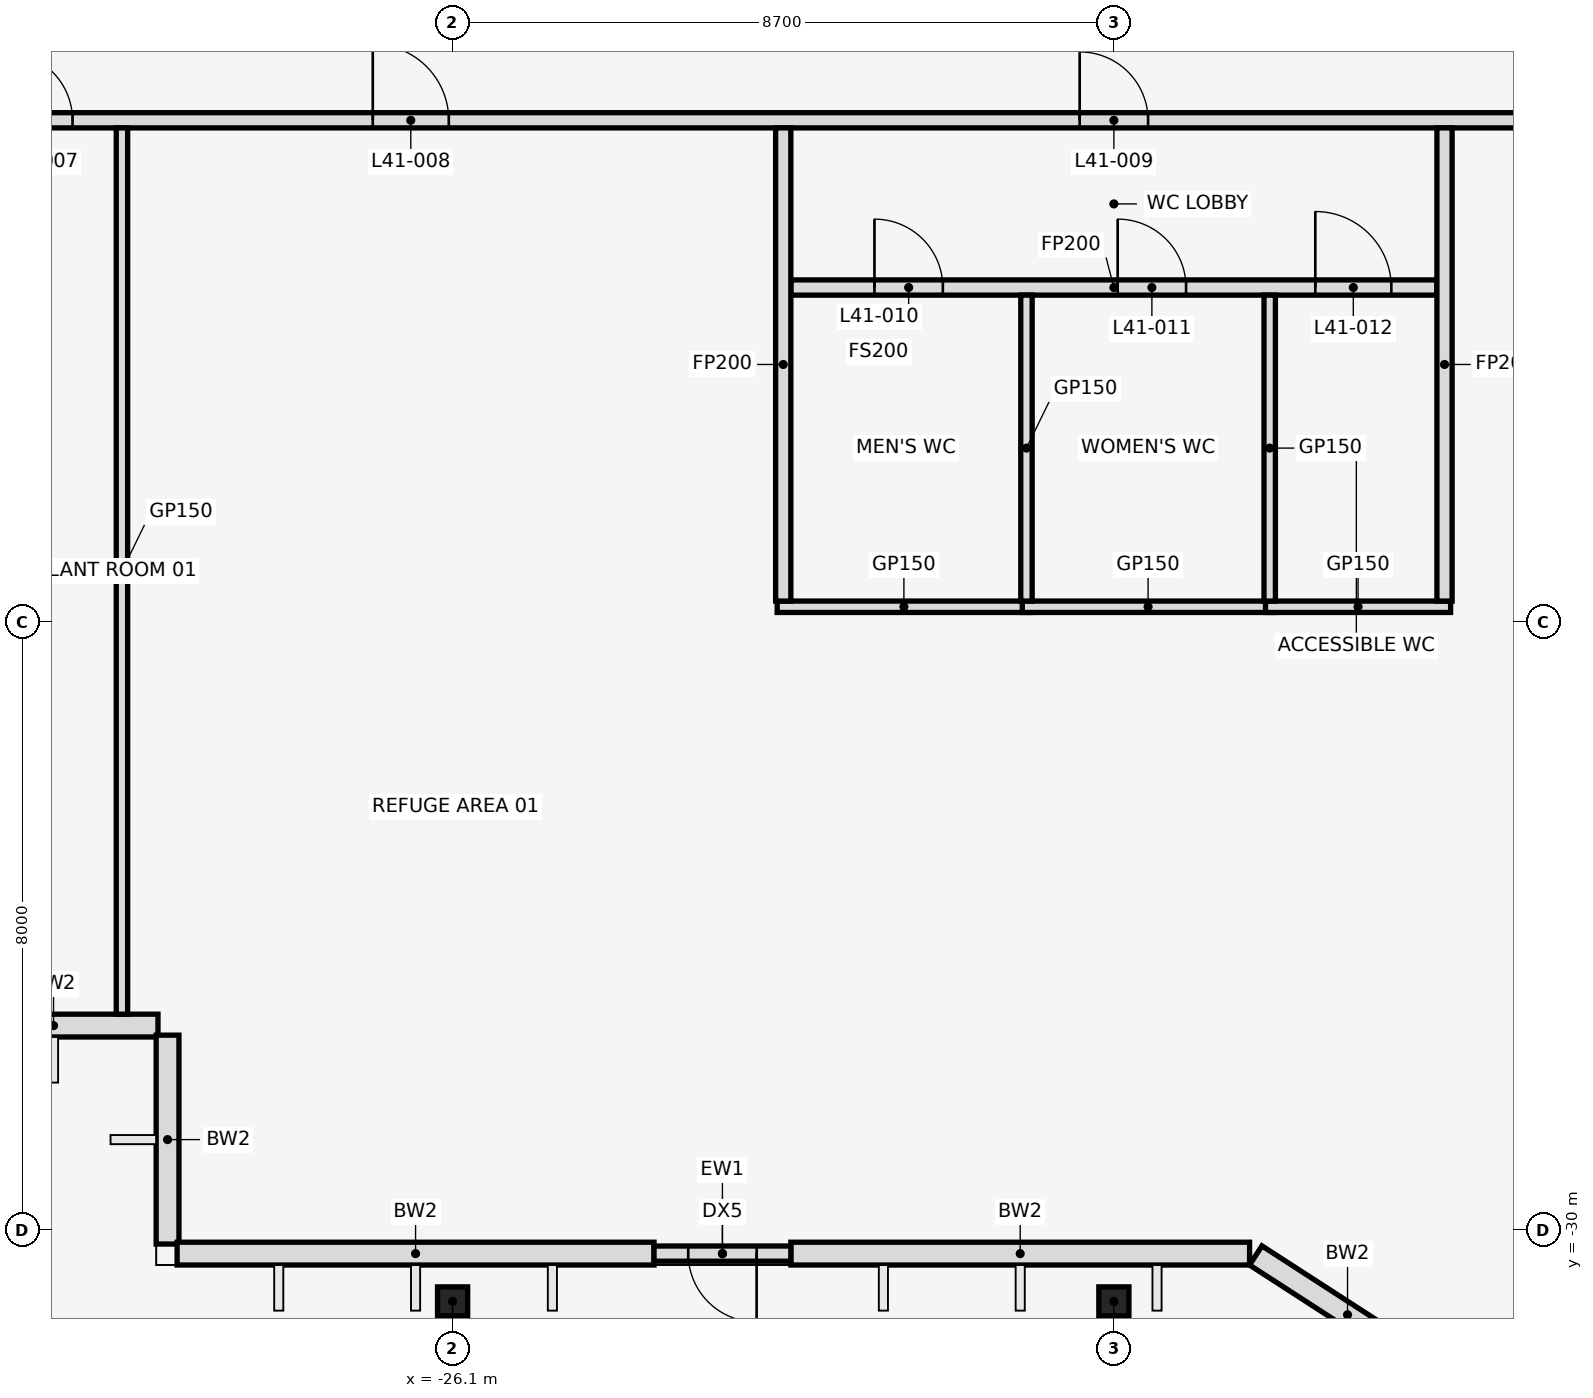
"""IFC4 building model, lengths in metres.
Left out: names, types, materials, properties, quantities, classifications, styles, units other than length and angle.
Written with IfcOpenShell. Run it as: python <this file> out.ifc"""

import sys

from ifc_helpers import new_model, si_unit, direction, frame, frame_2d, origin, origin_2d, place, context, subcontext, project, spatial, rectangle, i_section, extrude, element, fill, save


model = new_model("IFC4")
c1 = context("Model", 3, precision=1e-05, world=origin(), true_north=direction((0.0, 1.0)))
c2 = subcontext(c1, "Body", "Model", "MODEL_VIEW")
j1 = project(units=[si_unit("LENGTHUNIT", "METRE"), si_unit("PLANEANGLEUNIT", "RADIAN")], contexts=[c1])
p1 = place(None, origin())
s1 = spatial("IfcSite", under=j1, at=p1, CompositionType="ELEMENT")
p2 = place(p1, origin())
s2 = spatial("IfcBuilding", under=s1, at=p2, CompositionType="ELEMENT")
p3 = place(p2, frame((0.0, 0.0, 185.5)))
s3 = spatial("IfcBuildingStorey", under=s2, at=p3, CompositionType="ELEMENT", Elevation=185.5)
for number, where, z_axis, x_axis in (
    (1, (-26.1, -30.938, 0.0), (0.0, 0.0, 1.0), (1.0, 0.0, 0.0)),
    (2, (-17.4, -30.938, 0.0), (0.0, 0.0, 1.0), (1.0, 0.0, 0.0)),
):
    element("IfcColumn", number, at=place(p3, frame(where, z_axis=z_axis, x_axis=x_axis)), inside=s3, PredefinedType="COLUMN", context=c2, shape_type="SweptSolid", body=[
        extrude(i_section(OverallWidth=0.396, OverallDepth=0.381, WebThickness=0.019, FlangeThickness=0.03, at=origin_2d()), origin(), (0.0, 0.0, 1.0), 5.4),
    ])
for number, where, z_axis, x_axis in (
    (3, (-32.724, -27.31, 0.0), (0.0, 0.0, 1.0), (1.0, 0.0, 0.0)),
    (4, (-29.85, -27.436, 0.0), (0.0, 0.0, 1.0), (0.0, -1.0, 0.0)),
):
    element("IfcWall", number, at=place(p3, frame(where, z_axis=z_axis, x_axis=x_axis)), inside=s3, PredefinedType="STANDARD", context=c2, shape_type="SweptSolid", body=[
        extrude(rectangle(XDim=2.748, YDim=0.3, at=frame_2d((1.374, 0.0))), origin(), (0.0, 0.0, 1.0), 4.414),
    ])
p4 = place(p3, frame((-29.724, -30.31, 0.0), z_axis=(0.0, 0.0, 1.0), x_axis=(1.0, 0.0, 0.0)))
e5 = element("IfcWall", 5, at=p4, inside=s3, PredefinedType="STANDARD", context=c2, shape_type="SweptSolid", body=[
    extrude(rectangle(XDim=6.274, YDim=0.3, at=frame_2d((3.137, 0.0))), origin(), (0.0, 0.0, 1.0), 4.414),
])
p5 = place(p3, frame((-21.65, -30.31, 0.0), z_axis=(0.0, 0.0, 1.0), x_axis=(1.0, 0.0, 0.0)))
e6 = element("IfcWall", 6, at=p5, inside=s3, PredefinedType="STANDARD", context=c2, shape_type="SweptSolid", body=[
    extrude(rectangle(XDim=6.035, YDim=0.3, at=frame_2d((3.018, 0.0))), origin(), (0.0, 0.0, 1.0), 4.414),
])
p6 = place(p3, frame((-15.533, -30.334, 0.0), z_axis=(0.0, 0.0, 1.0), x_axis=(0.839779682339, -0.542927329512, 0.0)))
e7 = element("IfcWall", 7, at=p6, inside=s3, PredefinedType="STANDARD", context=c2, shape_type="SweptSolid", body=[
    extrude(rectangle(XDim=2.875, YDim=0.3, at=frame_2d((1.438, 0.0))), origin(), (0.0, 0.0, 1.0), 4.346),
])
p7 = place(p3, frame((-21.65, -30.31, 0.0), z_axis=(0.0, 0.0, 1.0), x_axis=(-1.0, 0.0, 0.0)))
e8 = element("IfcWall", 8, at=p7, inside=s3, PredefinedType="STANDARD", context=c2, shape_type="SweptSolid", body=[
    extrude(rectangle(XDim=1.8, YDim=0.2, at=frame_2d((0.9, 0.0))), origin(), (0.0, 0.0, 1.0), 5.25),
])
p8 = place(p7, frame((0.45, 0.0, 0.0)))
e9 = element("IfcOpeningElement", 9, at=p8, cuts=e8, PredefinedType="OPENING", context=c2, shape_type="SweptSolid", body=[
    extrude(rectangle(XDim=0.9, YDim=2.1, at=frame_2d((0.45, 1.05))), frame((0.0, 0.112, 0.0), z_axis=(0.0, -1.0, 0.0), x_axis=(1.0, 0.0, 0.0)), (0.0, 0.0, 1.0), 0.224),
])
p9 = place(p3, frame((-21.83, -21.8, 0.0), z_axis=(0.0, 0.0, 1.0), x_axis=(1.0, 0.0, 0.0)))
e10 = element("IfcWall", 10, at=p9, inside=s3, PredefinedType="PARTITIONING", context=c2, shape_type="SweptSolid", body=[
    extrude(rectangle(XDim=3.335, YDim=0.15, at=frame_2d((1.667, 0.0))), origin(), (0.0, 0.0, 1.0), 4.26),
])
p10 = place(p3, frame((-18.605, -21.8, 0.0), z_axis=(0.0, 0.0, 1.0), x_axis=(1.0, 0.0, 0.0)))
e11 = element("IfcWall", 11, at=p10, inside=s3, PredefinedType="PARTITIONING", context=c2, shape_type="SweptSolid", body=[
    extrude(rectangle(XDim=3.31, YDim=0.15, at=frame_2d((1.655, 0.0))), origin(), (0.0, 0.0, 1.0), 4.26),
])
p11 = place(p3, frame((-15.405, -21.8, 0.0), z_axis=(0.0, 0.0, 1.0), x_axis=(1.0, 0.0, 0.0)))
e12 = element("IfcWall", 12, at=p11, inside=s3, PredefinedType="PARTITIONING", context=c2, shape_type="SweptSolid", body=[
    extrude(rectangle(XDim=2.435, YDim=0.15, at=frame_2d((1.218, 0.0))), origin(), (0.0, 0.0, 1.0), 4.26),
])
p12 = place(p3, frame((-21.65, -17.6, 0.0), z_axis=(0.0, 0.0, 1.0), x_axis=(1.0, 0.0, 0.0)))
e13 = element("IfcWall", 13, at=p12, inside=s3, PredefinedType="PARTITIONING", context=c2, shape_type="SweptSolid", body=[
    extrude(rectangle(XDim=8.5, YDim=0.2, at=frame_2d((4.25, 0.0))), origin(), (0.0, 0.0, 1.0), 4.26),
])
p13 = place(p12, frame((1.1, 0.0, 0.0)))
e14 = element("IfcOpeningElement", 14, at=p13, cuts=e13, PredefinedType="OPENING", context=c2, shape_type="SweptSolid", body=[
    extrude(rectangle(XDim=0.9, YDim=2.1, at=frame_2d((0.45, 1.05))), frame((0.0, 0.112, 0.0), z_axis=(0.0, -1.0, 0.0), x_axis=(1.0, 0.0, 0.0)), (0.0, 0.0, 1.0), 0.224),
])
p14 = place(p12, frame((4.3, 0.0, 0.0)))
e15 = element("IfcOpeningElement", 15, at=p14, cuts=e13, PredefinedType="OPENING", context=c2, shape_type="SweptSolid", body=[
    extrude(rectangle(XDim=0.9, YDim=2.1, at=frame_2d((0.45, 1.05))), frame((0.0, 0.112, 0.0), z_axis=(0.0, -1.0, 0.0), x_axis=(1.0, 0.0, 0.0)), (0.0, 0.0, 1.0), 0.224),
])
p15 = place(p12, frame((6.9, 0.0, 0.0)))
e16 = element("IfcOpeningElement", 16, at=p15, cuts=e13, PredefinedType="OPENING", context=c2, shape_type="SweptSolid", body=[
    extrude(rectangle(XDim=1.0, YDim=2.1, at=frame_2d((0.5, 1.05))), frame((0.0, 0.112, 0.0), z_axis=(0.0, -1.0, 0.0), x_axis=(1.0, 0.0, 0.0)), (0.0, 0.0, 1.0), 0.224),
])
p16 = place(p3, frame((-32.7, -15.4, 0.0), z_axis=(0.0, 0.0, 1.0), x_axis=(1.0, 0.0, 0.0)))
e17 = element("IfcWall", 17, at=p16, inside=s3, PredefinedType="PARTITIONING", context=c2, shape_type="SweptSolid", body=[
    extrude(rectangle(XDim=65.4, YDim=0.2, at=frame_2d((32.7, 0.0))), origin(), (0.0, 0.0, 1.0), 4.26),
])
p17 = place(p16, frame((0.7, 0.0, 0.0)))
e18 = element("IfcOpeningElement", 18, at=p17, cuts=e17, PredefinedType="OPENING", context=c2, shape_type="SweptSolid", body=[
    extrude(rectangle(XDim=0.9, YDim=2.1, at=frame_2d((0.45, 1.05))), frame((0.0, 0.112, 0.0), z_axis=(0.0, -1.0, 0.0), x_axis=(1.0, 0.0, 0.0)), (0.0, 0.0, 1.0), 0.224),
])
p18 = place(p16, frame((5.55, 0.0, 0.0)))
e19 = element("IfcOpeningElement", 19, at=p18, cuts=e17, PredefinedType="OPENING", context=c2, shape_type="SweptSolid", body=[
    extrude(rectangle(XDim=1.0, YDim=2.1, at=frame_2d((0.5, 1.05))), frame((0.0, 0.112, 0.0), z_axis=(0.0, -1.0, 0.0), x_axis=(1.0, 0.0, 0.0)), (0.0, 0.0, 1.0), 0.224),
])
p19 = place(p16, frame((14.85, 0.0, 0.0)))
e20 = element("IfcOpeningElement", 20, at=p19, cuts=e17, PredefinedType="OPENING", context=c2, shape_type="SweptSolid", body=[
    extrude(rectangle(XDim=0.9, YDim=2.1, at=frame_2d((0.45, 1.05))), frame((0.0, 0.112, 0.0), z_axis=(0.0, -1.0, 0.0), x_axis=(1.0, 0.0, 0.0)), (0.0, 0.0, 1.0), 0.224),
])
p20 = place(p16, frame((23.55, 0.0, 0.0)))
e21 = element("IfcOpeningElement", 21, at=p20, cuts=e17, PredefinedType="OPENING", context=c2, shape_type="SweptSolid", body=[
    extrude(rectangle(XDim=1.0, YDim=2.1, at=frame_2d((0.5, 1.05))), frame((0.0, 0.112, 0.0), z_axis=(0.0, -1.0, 0.0), x_axis=(1.0, 0.0, 0.0)), (0.0, 0.0, 1.0), 0.224),
])
p21 = place(p16, frame((32.15, 0.0, 0.0)))
e22 = element("IfcOpeningElement", 22, at=p21, cuts=e17, PredefinedType="OPENING", context=c2, shape_type="SweptSolid", body=[
    extrude(rectangle(XDim=1.0, YDim=2.1, at=frame_2d((0.5, 1.05))), frame((0.0, 0.112, 0.0), z_axis=(0.0, -1.0, 0.0), x_axis=(1.0, 0.0, 0.0)), (0.0, 0.0, 1.0), 0.224),
])
p22 = place(p16, frame((40.95, 0.0, 0.0)))
e23 = element("IfcOpeningElement", 23, at=p22, cuts=e17, PredefinedType="OPENING", context=c2, shape_type="SweptSolid", body=[
    extrude(rectangle(XDim=1.0, YDim=2.1, at=frame_2d((0.5, 1.05))), frame((0.0, 0.112, 0.0), z_axis=(0.0, -1.0, 0.0), x_axis=(1.0, 0.0, 0.0)), (0.0, 0.0, 1.0), 0.224),
])
p23 = place(p16, frame((49.55, 0.0, 0.0)))
e24 = element("IfcOpeningElement", 24, at=p23, cuts=e17, PredefinedType="OPENING", context=c2, shape_type="SweptSolid", body=[
    extrude(rectangle(XDim=1.0, YDim=2.1, at=frame_2d((0.5, 1.05))), frame((0.0, 0.112, 0.0), z_axis=(0.0, -1.0, 0.0), x_axis=(1.0, 0.0, 0.0)), (0.0, 0.0, 1.0), 0.224),
])
p24 = place(p16, frame((58.85, 0.0, 0.0)))
e25 = element("IfcOpeningElement", 25, at=p24, cuts=e17, PredefinedType="OPENING", context=c2, shape_type="SweptSolid", body=[
    extrude(rectangle(XDim=1.0, YDim=2.1, at=frame_2d((0.5, 1.05))), frame((0.0, 0.112, 0.0), z_axis=(0.0, -1.0, 0.0), x_axis=(1.0, 0.0, 0.0)), (0.0, 0.0, 1.0), 0.224),
])
p25 = place(p16, frame((63.85, 0.0, 0.0)))
e26 = element("IfcOpeningElement", 26, at=p25, cuts=e17, PredefinedType="OPENING", context=c2, shape_type="SweptSolid", body=[
    extrude(rectangle(XDim=0.9, YDim=2.1, at=frame_2d((0.45, 1.05))), frame((0.0, 0.112, 0.0), z_axis=(0.0, -1.0, 0.0), x_axis=(1.0, 0.0, 0.0)), (0.0, 0.0, 1.0), 0.224),
])
p26 = place(p3, frame((-30.45, -27.16, 0.0), z_axis=(0.0, 0.0, 1.0), x_axis=(0.0, 1.0, 0.0)))
e27 = element("IfcWall", 27, at=p26, inside=s3, PredefinedType="PARTITIONING", context=c2, shape_type="SweptSolid", body=[
    extrude(rectangle(XDim=11.66, YDim=0.15, at=frame_2d((5.83, 0.0))), origin(), (0.0, 0.0, 1.0), 4.26),
])
p27 = place(p3, frame((-21.75, -21.725, 0.0), z_axis=(0.0, 0.0, 1.0), x_axis=(0.0, 1.0, 0.0)))
e28 = element("IfcWall", 28, at=p27, inside=s3, PredefinedType="PARTITIONING", context=c2, shape_type="SweptSolid", body=[
    extrude(rectangle(XDim=6.225, YDim=0.2, at=frame_2d((3.113, 0.0))), origin(), (0.0, 0.0, 1.0), 4.26),
])
for number, where, z_axis, x_axis in (
    (29, (-18.55, -21.725, 0.0), (0.0, 0.0, 1.0), (0.0, 1.0, 0.0)),
    (30, (-15.35, -21.725, 0.0), (0.0, 0.0, 1.0), (0.0, 1.0, 0.0)),
):
    element("IfcWall", number, at=place(p3, frame(where, z_axis=z_axis, x_axis=x_axis)), inside=s3, PredefinedType="PARTITIONING", context=c2, shape_type="SweptSolid", body=[
        extrude(rectangle(XDim=4.025, YDim=0.15, at=frame_2d((2.013, 0.0))), origin(), (0.0, 0.0, 1.0), 4.26),
    ])
p28 = place(p3, frame((-13.05, -21.725, 0.0), z_axis=(0.0, 0.0, 1.0), x_axis=(0.0, 1.0, 0.0)))
e31 = element("IfcWall", 31, at=p28, inside=s3, PredefinedType="PARTITIONING", context=c2, shape_type="SweptSolid", body=[
    extrude(rectangle(XDim=6.225, YDim=0.2, at=frame_2d((3.113, 0.0))), origin(), (0.0, 0.0, 1.0), 4.26),
])
p29 = place(p8, origin())
e32 = element("IfcDoor", 32, at=p29, inside=s3, OperationType="SINGLE_SWING_LEFT", PredefinedType="DOOR", context=c2, shape_type="SweptSolid", body=[
    extrude(rectangle(XDim=0.9, YDim=2.1, at=frame_2d((0.45, 1.05))), frame((0.0, 0.025, 0.0), z_axis=(0.0, -1.0, 0.0), x_axis=(1.0, 0.0, 0.0)), (0.0, 0.0, 1.0), 0.05),
])
fill(e9, e32)
p30 = place(p17, frame((0.9, 0.0, 0.0), z_axis=(0.0, 0.0, 1.0), x_axis=(-1.0, 0.0, 0.0)))
e33 = element("IfcDoor", 33, at=p30, inside=s3, OperationType="SINGLE_SWING_LEFT", PredefinedType="DOOR", context=c2, shape_type="SweptSolid", body=[
    extrude(rectangle(XDim=0.9, YDim=2.1, at=frame_2d((0.45, 1.05))), frame((0.0, 0.025, 0.0), z_axis=(0.0, -1.0, 0.0), x_axis=(1.0, 0.0, 0.0)), (0.0, 0.0, 1.0), 0.05),
])
fill(e18, e33)
p31 = place(p18, frame((1.0, 0.0, 0.0), z_axis=(0.0, 0.0, 1.0), x_axis=(-1.0, 0.0, 0.0)))
e34 = element("IfcDoor", 34, at=p31, inside=s3, OperationType="SINGLE_SWING_RIGHT", PredefinedType="DOOR", context=c2, shape_type="SweptSolid", body=[
    extrude(rectangle(XDim=1.0, YDim=2.1, at=frame_2d((0.5, 1.05))), frame((0.0, 0.025, 0.0), z_axis=(0.0, -1.0, 0.0), x_axis=(1.0, 0.0, 0.0)), (0.0, 0.0, 1.0), 0.05),
])
fill(e19, e34)
p32 = place(p19, frame((0.9, 0.0, 0.0), z_axis=(0.0, 0.0, 1.0), x_axis=(-1.0, 0.0, 0.0)))
e35 = element("IfcDoor", 35, at=p32, inside=s3, OperationType="SINGLE_SWING_RIGHT", PredefinedType="DOOR", context=c2, shape_type="SweptSolid", body=[
    extrude(rectangle(XDim=0.9, YDim=2.1, at=frame_2d((0.45, 1.05))), frame((0.0, 0.025, 0.0), z_axis=(0.0, -1.0, 0.0), x_axis=(1.0, 0.0, 0.0)), (0.0, 0.0, 1.0), 0.05),
])
fill(e20, e35)
p33 = place(p13, frame((0.9, 0.0, 0.0), z_axis=(0.0, 0.0, 1.0), x_axis=(-1.0, 0.0, 0.0)))
e36 = element("IfcDoor", 36, at=p33, inside=s3, OperationType="SINGLE_SWING_LEFT", PredefinedType="DOOR", context=c2, shape_type="SweptSolid", body=[
    extrude(rectangle(XDim=0.9, YDim=2.1, at=frame_2d((0.45, 1.05))), frame((0.0, 0.025, 0.0), z_axis=(0.0, -1.0, 0.0), x_axis=(1.0, 0.0, 0.0)), (0.0, 0.0, 1.0), 0.05),
])
fill(e14, e36)
p34 = place(p14, frame((0.9, 0.0, 0.0), z_axis=(0.0, 0.0, 1.0), x_axis=(-1.0, 0.0, 0.0)))
e37 = element("IfcDoor", 37, at=p34, inside=s3, OperationType="SINGLE_SWING_RIGHT", PredefinedType="DOOR", context=c2, shape_type="SweptSolid", body=[
    extrude(rectangle(XDim=0.9, YDim=2.1, at=frame_2d((0.45, 1.05))), frame((0.0, 0.025, 0.0), z_axis=(0.0, -1.0, 0.0), x_axis=(1.0, 0.0, 0.0)), (0.0, 0.0, 1.0), 0.05),
])
fill(e15, e37)
p35 = place(p15, frame((1.0, 0.0, 0.0), z_axis=(0.0, 0.0, 1.0), x_axis=(-1.0, 0.0, 0.0)))
e38 = element("IfcDoor", 38, at=p35, inside=s3, OperationType="SINGLE_SWING_RIGHT", PredefinedType="DOOR", context=c2, shape_type="SweptSolid", body=[
    extrude(rectangle(XDim=1.0, YDim=2.1, at=frame_2d((0.5, 1.05))), frame((0.0, 0.025, 0.0), z_axis=(0.0, -1.0, 0.0), x_axis=(1.0, 0.0, 0.0)), (0.0, 0.0, 1.0), 0.05),
])
fill(e16, e38)
save(model, sys.argv[1])
